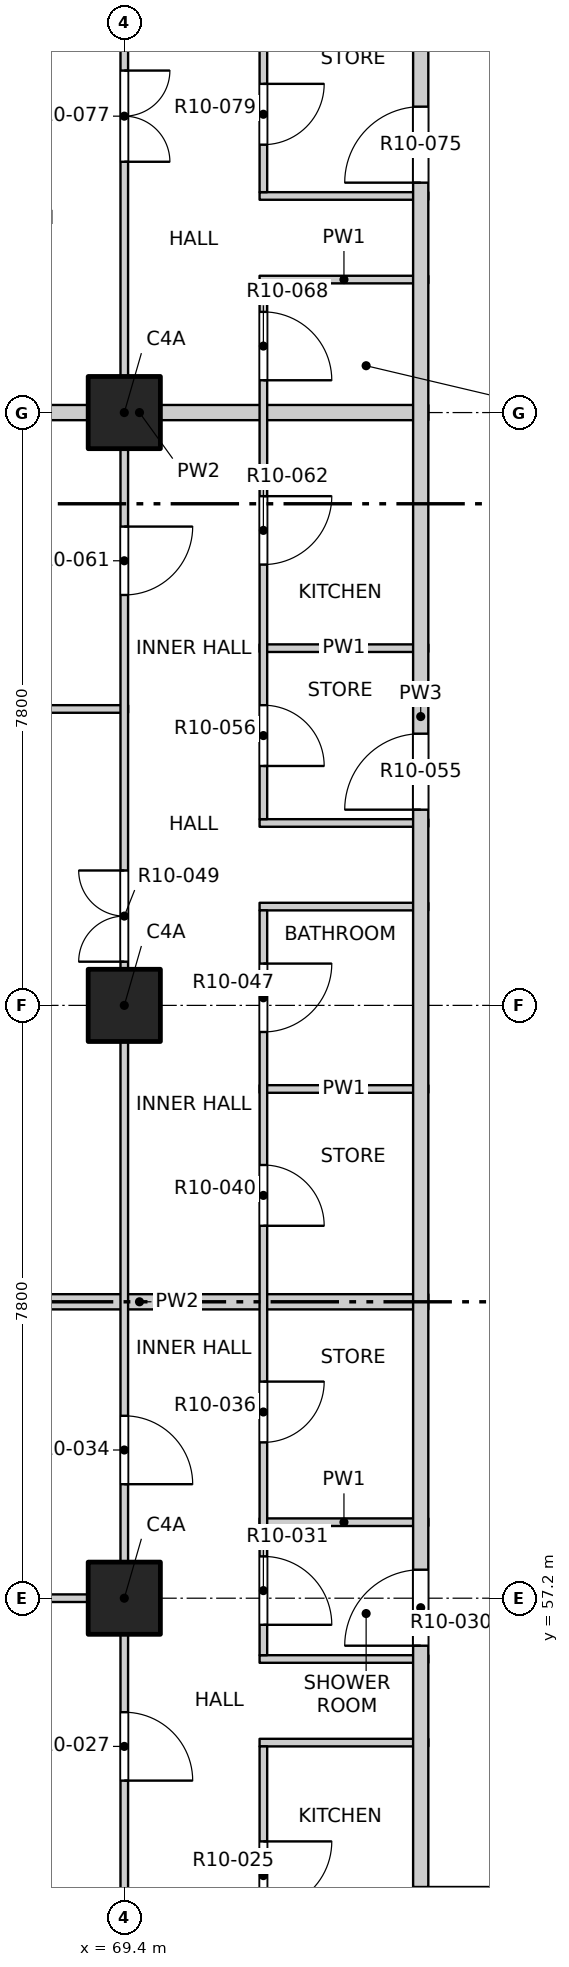
"""IFC4 building model, lengths in metres.
Left out: names, types, materials, properties, quantities, classifications, styles, units other than length and angle.
Written with IfcOpenShell. Run it as: python <this file> out.ifc"""

import sys

from ifc_helpers import new_model, si_unit, direction, frame, frame_2d, origin, origin_2d, place, context, subcontext, project, spatial, rectangle, extrude, element, fill, save


model = new_model("IFC4")
c1 = context("Model", 3, precision=1e-05, world=origin(), true_north=direction((0.0, 1.0)))
c2 = subcontext(c1, "Body", "Model", "MODEL_VIEW")
j1 = project(units=[si_unit("LENGTHUNIT", "METRE"), si_unit("PLANEANGLEUNIT", "RADIAN")], contexts=[c1])
p1 = place(None, origin())
s1 = spatial("IfcSite", under=j1, at=p1, CompositionType="ELEMENT")
p2 = place(p1, origin())
s2 = spatial("IfcBuilding", under=s1, at=p2, CompositionType="ELEMENT")
p3 = place(p2, frame((0.0, 0.0, 127.1)))
s3 = spatial("IfcBuildingStorey", under=s2, at=p3, CompositionType="ELEMENT", Elevation=127.1)
for number, where, z_axis, x_axis in (
    (1, (69.4, 57.2, -0.25), (0.0, 0.0, 1.0), (1.0, 0.0, 0.0)),
    (2, (69.4, 65.0, -0.25), (0.0, 0.0, 1.0), (1.0, 0.0, 0.0)),
    (3, (69.4, 72.8, -0.25), (0.0, 0.0, 1.0), (1.0, 0.0, 0.0)),
):
    element("IfcColumn", number, at=place(p3, frame(where, z_axis=z_axis, x_axis=x_axis)), inside=s3, PredefinedType="COLUMN", context=c2, shape_type="SweptSolid", body=[
        extrude(rectangle(XDim=0.95, YDim=0.95, at=origin_2d()), origin(), (0.0, 0.0, 1.0), 3.4),
    ])
p4 = place(p3, frame((73.2, 53.3, 0.0), z_axis=(0.0, 0.0, 1.0), x_axis=(1.0, 0.0, 0.0)))
e4 = element("IfcWall", 4, at=p4, inside=s3, PredefinedType="PARTITIONING", context=c2, shape_type="SweptSolid", body=[
    extrude(rectangle(XDim=23.6, YDim=0.2, at=frame_2d((11.8, 0.0))), origin(), (0.0, 0.0, 1.0), 3.15),
])
p5 = place(p4, frame((6.175, 0.0, 0.0)))
e5 = element("IfcOpeningElement", 5, at=p5, cuts=e4, PredefinedType="OPENING", context=c2, shape_type="SweptSolid", body=[
    extrude(rectangle(XDim=1.0, YDim=2.1, at=frame_2d((0.5, 1.05))), frame((0.0, 0.11, 0.0), z_axis=(0.0, -1.0, 0.0), x_axis=(1.0, 0.0, 0.0)), (0.0, 0.0, 1.0), 0.22),
])
p6 = place(p4, frame((18.775, 0.0, 0.0)))
e6 = element("IfcOpeningElement", 6, at=p6, cuts=e4, PredefinedType="OPENING", context=c2, shape_type="SweptSolid", body=[
    extrude(rectangle(XDim=1.0, YDim=2.1, at=frame_2d((0.5, 1.05))), frame((0.0, 0.11, 0.0), z_axis=(0.0, -1.0, 0.0), x_axis=(1.0, 0.0, 0.0)), (0.0, 0.0, 1.0), 0.22),
])
for number, where, z_axis, x_axis in (
    (7, (71.18, 55.3, 0.0), (0.0, 0.0, 1.0), (1.0, 0.0, 0.0)),
    (8, (71.18, 56.4, 0.0), (0.0, 0.0, 1.0), (1.0, 0.0, 0.0)),
):
    element("IfcWall", number, at=place(p3, frame(where, z_axis=z_axis, x_axis=x_axis)), inside=s3, PredefinedType="PARTITIONING", context=c2, shape_type="SweptSolid", body=[
        extrude(rectangle(XDim=2.22, YDim=0.1, at=frame_2d((1.11, 0.0))), origin(), (0.0, 0.0, 1.0), 3.15),
    ])
p7 = place(p3, frame((65.8, 57.2, 0.0), z_axis=(0.0, 0.0, 1.0), x_axis=(1.0, 0.0, 0.0)))
e9 = element("IfcWall", 9, at=p7, inside=s3, PredefinedType="PARTITIONING", context=c2, shape_type="SweptSolid", body=[
    extrude(rectangle(XDim=3.65, YDim=0.1, at=frame_2d((1.825, 0.0))), origin(), (0.0, 0.0, 1.0), 3.15),
])
p8 = place(p3, frame((71.18, 58.2, 0.0), z_axis=(0.0, 0.0, 1.0), x_axis=(1.0, 0.0, 0.0)))
e10 = element("IfcWall", 10, at=p8, inside=s3, PredefinedType="PARTITIONING", context=c2, shape_type="SweptSolid", body=[
    extrude(rectangle(XDim=2.22, YDim=0.1, at=frame_2d((1.11, 0.0))), origin(), (0.0, 0.0, 1.0), 3.15),
])
p9 = place(p3, frame((65.8, 61.1, 0.0), z_axis=(0.0, 0.0, 1.0), x_axis=(1.0, 0.0, 0.0)))
e11 = element("IfcWall", 11, at=p9, inside=s3, PredefinedType="PARTITIONING", context=c2, shape_type="SweptSolid", body=[
    extrude(rectangle(XDim=7.6, YDim=0.2, at=frame_2d((3.8, 0.0))), origin(), (0.0, 0.0, 1.0), 2.55),
])
for number, where, z_axis, x_axis in (
    (12, (71.18, 63.9, 0.0), (0.0, 0.0, 1.0), (1.0, 0.0, 0.0)),
    (13, (71.18, 66.3, 0.0), (0.0, 0.0, 1.0), (1.0, 0.0, 0.0)),
    (14, (71.18, 67.4, 0.0), (0.0, 0.0, 1.0), (1.0, 0.0, 0.0)),
):
    element("IfcWall", number, at=place(p3, frame(where, z_axis=z_axis, x_axis=x_axis)), inside=s3, PredefinedType="PARTITIONING", context=c2, shape_type="SweptSolid", body=[
        extrude(rectangle(XDim=2.22, YDim=0.1, at=frame_2d((1.11, 0.0))), origin(), (0.0, 0.0, 1.0), 3.15),
    ])
p10 = place(p3, frame((65.8, 68.9, 0.0), z_axis=(0.0, 0.0, 1.0), x_axis=(1.0, 0.0, 0.0)))
e15 = element("IfcWall", 15, at=p10, inside=s3, PredefinedType="PARTITIONING", context=c2, shape_type="SweptSolid", body=[
    extrude(rectangle(XDim=3.65, YDim=0.1, at=frame_2d((1.825, 0.0))), origin(), (0.0, 0.0, 1.0), 2.55),
])
p11 = place(p3, frame((71.18, 69.7, 0.0), z_axis=(0.0, 0.0, 1.0), x_axis=(1.0, 0.0, 0.0)))
e16 = element("IfcWall", 16, at=p11, inside=s3, PredefinedType="PARTITIONING", context=c2, shape_type="SweptSolid", body=[
    extrude(rectangle(XDim=2.22, YDim=0.1, at=frame_2d((1.11, 0.0))), origin(), (0.0, 0.0, 1.0), 3.15),
])
p12 = place(p3, frame((65.8, 72.8, 0.0), z_axis=(0.0, 0.0, 1.0), x_axis=(1.0, 0.0, 0.0)))
e17 = element("IfcWall", 17, at=p12, inside=s3, PredefinedType="PARTITIONING", context=c2, shape_type="SweptSolid", body=[
    extrude(rectangle(XDim=7.6, YDim=0.2, at=frame_2d((3.8, 0.0))), origin(), (0.0, 0.0, 1.0), 3.15),
])
for number, where, z_axis, x_axis in (
    (18, (71.18, 74.55, 0.0), (0.0, 0.0, 1.0), (1.0, 0.0, 0.0)),
    (19, (71.18, 75.65, 0.0), (0.0, 0.0, 1.0), (1.0, 0.0, 0.0)),
):
    element("IfcWall", number, at=place(p3, frame(where, z_axis=z_axis, x_axis=x_axis)), inside=s3, PredefinedType="PARTITIONING", context=c2, shape_type="SweptSolid", body=[
        extrude(rectangle(XDim=2.22, YDim=0.1, at=frame_2d((1.11, 0.0))), origin(), (0.0, 0.0, 1.0), 3.15),
    ])
p13 = place(p3, frame((69.4, 45.8, 0.0), z_axis=(0.0, 0.0, 1.0), x_axis=(0.0, 1.0, 0.0)))
e20 = element("IfcWall", 20, at=p13, inside=s3, PredefinedType="PARTITIONING", context=c2, shape_type="SweptSolid", body=[
    extrude(rectangle(XDim=38.4, YDim=0.1, at=frame_2d((19.2, 0.0))), origin(), (0.0, 0.0, 1.0), 3.15),
])
p14 = place(p13, frame((1.05, 0.0, 0.0)))
e21 = element("IfcOpeningElement", 21, at=p14, cuts=e20, PredefinedType="OPENING", context=c2, shape_type="SweptSolid", body=[
    extrude(rectangle(XDim=1.2, YDim=2.1, at=frame_2d((0.6, 1.05))), frame((0.0, 0.06, 0.0), z_axis=(0.0, -1.0, 0.0), x_axis=(1.0, 0.0, 0.0)), (0.0, 0.0, 1.0), 0.12),
])
p15 = place(p13, frame((5.1, 0.0, 0.0)))
e22 = element("IfcOpeningElement", 22, at=p15, cuts=e20, PredefinedType="OPENING", context=c2, shape_type="SweptSolid", body=[
    extrude(rectangle(XDim=0.9, YDim=2.1, at=frame_2d((0.45, 1.05))), frame((0.0, 0.06, 0.0), z_axis=(0.0, -1.0, 0.0), x_axis=(1.0, 0.0, 0.0)), (0.0, 0.0, 1.0), 0.12),
])
p16 = place(p13, frame((9.0, 0.0, 0.0)))
e23 = element("IfcOpeningElement", 23, at=p16, cuts=e20, PredefinedType="OPENING", context=c2, shape_type="SweptSolid", body=[
    extrude(rectangle(XDim=0.9, YDim=2.1, at=frame_2d((0.45, 1.05))), frame((0.0, 0.06, 0.0), z_axis=(0.0, -1.0, 0.0), x_axis=(1.0, 0.0, 0.0)), (0.0, 0.0, 1.0), 0.12),
])
p17 = place(p13, frame((12.9, 0.0, 0.0)))
e24 = element("IfcOpeningElement", 24, at=p17, cuts=e20, PredefinedType="OPENING", context=c2, shape_type="SweptSolid", body=[
    extrude(rectangle(XDim=0.9, YDim=2.1, at=frame_2d((0.45, 1.05))), frame((0.0, 0.06, 0.0), z_axis=(0.0, -1.0, 0.0), x_axis=(1.0, 0.0, 0.0)), (0.0, 0.0, 1.0), 0.12),
])
p18 = place(p13, frame((19.775, 0.0, 0.0)))
e25 = element("IfcOpeningElement", 25, at=p18, cuts=e20, PredefinedType="OPENING", context=c2, shape_type="SweptSolid", body=[
    extrude(rectangle(XDim=1.2, YDim=2.1, at=frame_2d((0.6, 1.05))), frame((0.0, 0.06, 0.0), z_axis=(0.0, -1.0, 0.0), x_axis=(1.0, 0.0, 0.0)), (0.0, 0.0, 1.0), 0.12),
])
p19 = place(p13, frame((24.6, 0.0, 0.0)))
e26 = element("IfcOpeningElement", 26, at=p19, cuts=e20, PredefinedType="OPENING", context=c2, shape_type="SweptSolid", body=[
    extrude(rectangle(XDim=0.9, YDim=2.1, at=frame_2d((0.45, 1.05))), frame((0.0, 0.06, 0.0), z_axis=(0.0, -1.0, 0.0), x_axis=(1.0, 0.0, 0.0)), (0.0, 0.0, 1.0), 0.12),
])
p20 = place(p13, frame((30.3, 0.0, 0.0)))
e27 = element("IfcOpeningElement", 27, at=p20, cuts=e20, PredefinedType="OPENING", context=c2, shape_type="SweptSolid", body=[
    extrude(rectangle(XDim=1.2, YDim=2.1, at=frame_2d((0.6, 1.05))), frame((0.0, 0.06, 0.0), z_axis=(0.0, -1.0, 0.0), x_axis=(1.0, 0.0, 0.0)), (0.0, 0.0, 1.0), 0.12),
])
p21 = place(p13, frame((36.15, 0.0, 0.0)))
e28 = element("IfcOpeningElement", 28, at=p21, cuts=e20, PredefinedType="OPENING", context=c2, shape_type="SweptSolid", body=[
    extrude(rectangle(XDim=1.2, YDim=2.1, at=frame_2d((0.6, 1.05))), frame((0.0, 0.06, 0.0), z_axis=(0.0, -1.0, 0.0), x_axis=(1.0, 0.0, 0.0)), (0.0, 0.0, 1.0), 0.12),
])
p22 = place(p3, frame((71.23, 49.45, 0.0), z_axis=(0.0, 0.0, 1.0), x_axis=(0.0, 1.0, 0.0)))
e29 = element("IfcWall", 29, at=p22, inside=s3, PredefinedType="PARTITIONING", context=c2, shape_type="SweptSolid", body=[
    extrude(rectangle(XDim=5.8, YDim=0.1, at=frame_2d((2.9, 0.0))), origin(), (0.0, 0.0, 1.0), 3.15),
])
p23 = place(p22, frame((0.7, 0.0, 0.0)))
e30 = element("IfcOpeningElement", 30, at=p23, cuts=e29, PredefinedType="OPENING", context=c2, shape_type="SweptSolid", body=[
    extrude(rectangle(XDim=0.9, YDim=2.1, at=frame_2d((0.45, 1.05))), frame((0.0, 0.06, 0.0), z_axis=(0.0, -1.0, 0.0), x_axis=(1.0, 0.0, 0.0)), (0.0, 0.0, 1.0), 0.12),
])
p24 = place(p22, frame((3.65, 0.0, 0.0)))
e31 = element("IfcOpeningElement", 31, at=p24, cuts=e29, PredefinedType="OPENING", context=c2, shape_type="SweptSolid", body=[
    extrude(rectangle(XDim=0.9, YDim=2.1, at=frame_2d((0.45, 1.05))), frame((0.0, 0.06, 0.0), z_axis=(0.0, -1.0, 0.0), x_axis=(1.0, 0.0, 0.0)), (0.0, 0.0, 1.0), 0.12),
])
p25 = place(p3, frame((71.23, 56.45, 0.0), z_axis=(0.0, 0.0, 1.0), x_axis=(0.0, 1.0, 0.0)))
e32 = element("IfcWall", 32, at=p25, inside=s3, PredefinedType="PARTITIONING", context=c2, shape_type="SweptSolid", body=[
    extrude(rectangle(XDim=9.8, YDim=0.1, at=frame_2d((4.9, 0.0))), origin(), (0.0, 0.0, 1.0), 3.15),
])
p26 = place(p25, frame((0.4, 0.0, 0.0)))
e33 = element("IfcOpeningElement", 33, at=p26, cuts=e32, PredefinedType="OPENING", context=c2, shape_type="SweptSolid", body=[
    extrude(rectangle(XDim=0.9, YDim=2.1, at=frame_2d((0.45, 1.05))), frame((0.0, 0.06, 0.0), z_axis=(0.0, -1.0, 0.0), x_axis=(1.0, 0.0, 0.0)), (0.0, 0.0, 1.0), 0.12),
])
p27 = place(p25, frame((2.8, 0.0, 0.0)))
e34 = element("IfcOpeningElement", 34, at=p27, cuts=e32, PredefinedType="OPENING", context=c2, shape_type="SweptSolid", body=[
    extrude(rectangle(XDim=0.8, YDim=2.1, at=frame_2d((0.4, 1.05))), frame((0.0, 0.06, 0.0), z_axis=(0.0, -1.0, 0.0), x_axis=(1.0, 0.0, 0.0)), (0.0, 0.0, 1.0), 0.12),
])
p28 = place(p25, frame((5.65, 0.0, 0.0)))
e35 = element("IfcOpeningElement", 35, at=p28, cuts=e32, PredefinedType="OPENING", context=c2, shape_type="SweptSolid", body=[
    extrude(rectangle(XDim=0.8, YDim=2.1, at=frame_2d((0.4, 1.05))), frame((0.0, 0.06, 0.0), z_axis=(0.0, -1.0, 0.0), x_axis=(1.0, 0.0, 0.0)), (0.0, 0.0, 1.0), 0.12),
])
p29 = place(p25, frame((8.2, 0.0, 0.0)))
e36 = element("IfcOpeningElement", 36, at=p29, cuts=e32, PredefinedType="OPENING", context=c2, shape_type="SweptSolid", body=[
    extrude(rectangle(XDim=0.9, YDim=2.1, at=frame_2d((0.45, 1.05))), frame((0.0, 0.06, 0.0), z_axis=(0.0, -1.0, 0.0), x_axis=(1.0, 0.0, 0.0)), (0.0, 0.0, 1.0), 0.12),
])
p30 = place(p3, frame((71.23, 67.45, 0.0), z_axis=(0.0, 0.0, 1.0), x_axis=(0.0, 1.0, 0.0)))
e37 = element("IfcWall", 37, at=p30, inside=s3, PredefinedType="PARTITIONING", context=c2, shape_type="SweptSolid", body=[
    extrude(rectangle(XDim=7.05, YDim=0.1, at=frame_2d((3.525, 0.0))), origin(), (0.0, 0.0, 1.0), 3.15),
])
p31 = place(p30, frame((0.7, 0.0, 0.0)))
e38 = element("IfcOpeningElement", 38, at=p31, cuts=e37, PredefinedType="OPENING", context=c2, shape_type="SweptSolid", body=[
    extrude(rectangle(XDim=0.8, YDim=2.1, at=frame_2d((0.4, 1.05))), frame((0.0, 0.06, 0.0), z_axis=(0.0, -1.0, 0.0), x_axis=(1.0, 0.0, 0.0)), (0.0, 0.0, 1.0), 0.12),
])
p32 = place(p30, frame((3.35, 0.0, 0.0)))
e39 = element("IfcOpeningElement", 39, at=p32, cuts=e37, PredefinedType="OPENING", context=c2, shape_type="SweptSolid", body=[
    extrude(rectangle(XDim=0.9, YDim=2.1, at=frame_2d((0.45, 1.05))), frame((0.0, 0.06, 0.0), z_axis=(0.0, -1.0, 0.0), x_axis=(1.0, 0.0, 0.0)), (0.0, 0.0, 1.0), 0.12),
])
p33 = place(p30, frame((5.775, 0.0, 0.0)))
e40 = element("IfcOpeningElement", 40, at=p33, cuts=e37, PredefinedType="OPENING", context=c2, shape_type="SweptSolid", body=[
    extrude(rectangle(XDim=0.9, YDim=2.1, at=frame_2d((0.45, 1.05))), frame((0.0, 0.06, 0.0), z_axis=(0.0, -1.0, 0.0), x_axis=(1.0, 0.0, 0.0)), (0.0, 0.0, 1.0), 0.12),
])
p34 = place(p3, frame((71.23, 75.7, 0.0), z_axis=(0.0, 0.0, 1.0), x_axis=(0.0, 1.0, 0.0)))
e41 = element("IfcWall", 41, at=p34, inside=s3, PredefinedType="PARTITIONING", context=c2, shape_type="SweptSolid", body=[
    extrude(rectangle(XDim=4.85, YDim=0.1, at=frame_2d((2.425, 0.0))), origin(), (0.0, 0.0, 1.0), 3.15),
])
p35 = place(p34, frame((0.625, 0.0, 0.0)))
e42 = element("IfcOpeningElement", 42, at=p35, cuts=e41, PredefinedType="OPENING", context=c2, shape_type="SweptSolid", body=[
    extrude(rectangle(XDim=0.8, YDim=2.1, at=frame_2d((0.4, 1.05))), frame((0.0, 0.06, 0.0), z_axis=(0.0, -1.0, 0.0), x_axis=(1.0, 0.0, 0.0)), (0.0, 0.0, 1.0), 0.12),
])
p36 = place(p34, frame((3.05, 0.0, 0.0)))
e43 = element("IfcOpeningElement", 43, at=p36, cuts=e41, PredefinedType="OPENING", context=c2, shape_type="SweptSolid", body=[
    extrude(rectangle(XDim=0.9, YDim=2.1, at=frame_2d((0.45, 1.05))), frame((0.0, 0.06, 0.0), z_axis=(0.0, -1.0, 0.0), x_axis=(1.0, 0.0, 0.0)), (0.0, 0.0, 1.0), 0.12),
])
p37 = place(p3, frame((73.3, 53.4, 0.0), z_axis=(0.0, 0.0, 1.0), x_axis=(0.0, 1.0, 0.0)))
e44 = element("IfcWall", 44, at=p37, inside=s3, PredefinedType="PARTITIONING", context=c2, shape_type="SweptSolid", body=[
    extrude(rectangle(XDim=30.8, YDim=0.2, at=frame_2d((15.4, 0.0))), origin(), (0.0, 0.0, 1.0), 3.15),
])
p38 = place(p37, frame((3.175, 0.0, 0.0)))
e45 = element("IfcOpeningElement", 45, at=p38, cuts=e44, PredefinedType="OPENING", context=c2, shape_type="SweptSolid", body=[
    extrude(rectangle(XDim=1.0, YDim=2.1, at=frame_2d((0.5, 1.05))), frame((0.0, 0.11, 0.0), z_axis=(0.0, -1.0, 0.0), x_axis=(1.0, 0.0, 0.0)), (0.0, 0.0, 1.0), 0.22),
])
p39 = place(p37, frame((14.175, 0.0, 0.0)))
e46 = element("IfcOpeningElement", 46, at=p39, cuts=e44, PredefinedType="OPENING", context=c2, shape_type="SweptSolid", body=[
    extrude(rectangle(XDim=1.0, YDim=2.1, at=frame_2d((0.5, 1.05))), frame((0.0, 0.11, 0.0), z_axis=(0.0, -1.0, 0.0), x_axis=(1.0, 0.0, 0.0)), (0.0, 0.0, 1.0), 0.22),
])
p40 = place(p37, frame((22.425, 0.0, 0.0)))
e47 = element("IfcOpeningElement", 47, at=p40, cuts=e44, PredefinedType="OPENING", context=c2, shape_type="SweptSolid", body=[
    extrude(rectangle(XDim=1.0, YDim=2.1, at=frame_2d((0.5, 1.05))), frame((0.0, 0.11, 0.0), z_axis=(0.0, -1.0, 0.0), x_axis=(1.0, 0.0, 0.0)), (0.0, 0.0, 1.0), 0.22),
])
p41 = place(p24, origin())
e48 = element("IfcDoor", 48, at=p41, inside=s3, OperationType="SINGLE_SWING_LEFT", PredefinedType="DOOR", context=c2, shape_type="SweptSolid", body=[
    extrude(rectangle(XDim=0.9, YDim=2.1, at=frame_2d((0.45, 1.05))), frame((0.0, 0.025, 0.0), z_axis=(0.0, -1.0, 0.0), x_axis=(1.0, 0.0, 0.0)), (0.0, 0.0, 1.0), 0.05),
])
fill(e31, e48)
p42 = place(p16, origin())
e49 = element("IfcDoor", 49, at=p42, inside=s3, OperationType="SINGLE_SWING_RIGHT", PredefinedType="DOOR", context=c2, shape_type="SweptSolid", body=[
    extrude(rectangle(XDim=0.9, YDim=2.1, at=frame_2d((0.45, 1.05))), frame((0.0, 0.025, 0.0), z_axis=(0.0, -1.0, 0.0), x_axis=(1.0, 0.0, 0.0)), (0.0, 0.0, 1.0), 0.05),
])
fill(e23, e49)
p43 = place(p38, origin())
e50 = element("IfcDoor", 50, at=p43, inside=s3, OperationType="SINGLE_SWING_RIGHT", PredefinedType="DOOR", context=c2, shape_type="SweptSolid", body=[
    extrude(rectangle(XDim=1.0, YDim=2.1, at=frame_2d((0.5, 1.05))), frame((0.0, 0.025, 0.0), z_axis=(0.0, -1.0, 0.0), x_axis=(1.0, 0.0, 0.0)), (0.0, 0.0, 1.0), 0.05),
])
fill(e45, e50)
p44 = place(p26, origin())
e51 = element("IfcDoor", 51, at=p44, inside=s3, OperationType="SINGLE_SWING_RIGHT", PredefinedType="DOOR", context=c2, shape_type="SweptSolid", body=[
    extrude(rectangle(XDim=0.9, YDim=2.1, at=frame_2d((0.45, 1.05))), frame((0.0, 0.025, 0.0), z_axis=(0.0, -1.0, 0.0), x_axis=(1.0, 0.0, 0.0)), (0.0, 0.0, 1.0), 0.05),
])
fill(e33, e51)
p45 = place(p17, origin())
e52 = element("IfcDoor", 52, at=p45, inside=s3, OperationType="SINGLE_SWING_RIGHT", PredefinedType="DOOR", context=c2, shape_type="SweptSolid", body=[
    extrude(rectangle(XDim=0.9, YDim=2.1, at=frame_2d((0.45, 1.05))), frame((0.0, 0.025, 0.0), z_axis=(0.0, -1.0, 0.0), x_axis=(1.0, 0.0, 0.0)), (0.0, 0.0, 1.0), 0.05),
])
fill(e24, e52)
p46 = place(p27, origin())
e53 = element("IfcDoor", 53, at=p46, inside=s3, OperationType="SINGLE_SWING_LEFT", PredefinedType="DOOR", context=c2, shape_type="SweptSolid", body=[
    extrude(rectangle(XDim=0.8, YDim=2.1, at=frame_2d((0.4, 1.05))), frame((0.0, 0.025, 0.0), z_axis=(0.0, -1.0, 0.0), x_axis=(1.0, 0.0, 0.0)), (0.0, 0.0, 1.0), 0.05),
])
fill(e34, e53)
p47 = place(p28, origin())
e54 = element("IfcDoor", 54, at=p47, inside=s3, OperationType="SINGLE_SWING_RIGHT", PredefinedType="DOOR", context=c2, shape_type="SweptSolid", body=[
    extrude(rectangle(XDim=0.8, YDim=2.1, at=frame_2d((0.4, 1.05))), frame((0.0, 0.025, 0.0), z_axis=(0.0, -1.0, 0.0), x_axis=(1.0, 0.0, 0.0)), (0.0, 0.0, 1.0), 0.05),
])
fill(e35, e54)
p48 = place(p29, origin())
e55 = element("IfcDoor", 55, at=p48, inside=s3, OperationType="SINGLE_SWING_LEFT", PredefinedType="DOOR", context=c2, shape_type="SweptSolid", body=[
    extrude(rectangle(XDim=0.9, YDim=2.1, at=frame_2d((0.45, 1.05))), frame((0.0, 0.025, 0.0), z_axis=(0.0, -1.0, 0.0), x_axis=(1.0, 0.0, 0.0)), (0.0, 0.0, 1.0), 0.05),
])
fill(e36, e55)
p49 = place(p18, origin())
e56 = element("IfcDoor", 56, at=p49, inside=s3, OperationType="DOUBLE_DOOR_SINGLE_SWING", PredefinedType="DOOR", context=c2, shape_type="SweptSolid", body=[
    extrude(rectangle(XDim=1.2, YDim=2.1, at=frame_2d((0.6, 1.05))), frame((0.0, 0.025, 0.0), z_axis=(0.0, -1.0, 0.0), x_axis=(1.0, 0.0, 0.0)), (0.0, 0.0, 1.0), 0.05),
])
fill(e25, e56)
p50 = place(p39, origin())
e57 = element("IfcDoor", 57, at=p50, inside=s3, OperationType="SINGLE_SWING_RIGHT", PredefinedType="DOOR", context=c2, shape_type="SweptSolid", body=[
    extrude(rectangle(XDim=1.0, YDim=2.1, at=frame_2d((0.5, 1.05))), frame((0.0, 0.025, 0.0), z_axis=(0.0, -1.0, 0.0), x_axis=(1.0, 0.0, 0.0)), (0.0, 0.0, 1.0), 0.05),
])
fill(e46, e57)
p51 = place(p31, origin())
e58 = element("IfcDoor", 58, at=p51, inside=s3, OperationType="SINGLE_SWING_RIGHT", PredefinedType="DOOR", context=c2, shape_type="SweptSolid", body=[
    extrude(rectangle(XDim=0.8, YDim=2.1, at=frame_2d((0.4, 1.05))), frame((0.0, 0.025, 0.0), z_axis=(0.0, -1.0, 0.0), x_axis=(1.0, 0.0, 0.0)), (0.0, 0.0, 1.0), 0.05),
])
fill(e38, e58)
p52 = place(p19, origin())
e59 = element("IfcDoor", 59, at=p52, inside=s3, OperationType="SINGLE_SWING_LEFT", PredefinedType="DOOR", context=c2, shape_type="SweptSolid", body=[
    extrude(rectangle(XDim=0.9, YDim=2.1, at=frame_2d((0.45, 1.05))), frame((0.0, 0.025, 0.0), z_axis=(0.0, -1.0, 0.0), x_axis=(1.0, 0.0, 0.0)), (0.0, 0.0, 1.0), 0.05),
])
fill(e26, e59)
p53 = place(p32, origin())
e60 = element("IfcDoor", 60, at=p53, inside=s3, OperationType="SINGLE_SWING_LEFT", PredefinedType="DOOR", context=c2, shape_type="SweptSolid", body=[
    extrude(rectangle(XDim=0.9, YDim=2.1, at=frame_2d((0.45, 1.05))), frame((0.0, 0.025, 0.0), z_axis=(0.0, -1.0, 0.0), x_axis=(1.0, 0.0, 0.0)), (0.0, 0.0, 1.0), 0.05),
])
fill(e39, e60)
p54 = place(p33, origin())
e61 = element("IfcDoor", 61, at=p54, inside=s3, OperationType="SINGLE_SWING_RIGHT", PredefinedType="DOOR", context=c2, shape_type="SweptSolid", body=[
    extrude(rectangle(XDim=0.9, YDim=2.1, at=frame_2d((0.45, 1.05))), frame((0.0, 0.025, 0.0), z_axis=(0.0, -1.0, 0.0), x_axis=(1.0, 0.0, 0.0)), (0.0, 0.0, 1.0), 0.05),
])
fill(e40, e61)
p55 = place(p40, origin())
e62 = element("IfcDoor", 62, at=p55, inside=s3, OperationType="SINGLE_SWING_RIGHT", PredefinedType="DOOR", context=c2, shape_type="SweptSolid", body=[
    extrude(rectangle(XDim=1.0, YDim=2.1, at=frame_2d((0.5, 1.05))), frame((0.0, 0.025, 0.0), z_axis=(0.0, -1.0, 0.0), x_axis=(1.0, 0.0, 0.0)), (0.0, 0.0, 1.0), 0.05),
])
fill(e47, e62)
p56 = place(p20, origin())
e63 = element("IfcDoor", 63, at=p56, inside=s3, OperationType="DOUBLE_DOOR_SINGLE_SWING", PredefinedType="DOOR", context=c2, shape_type="SweptSolid", body=[
    extrude(rectangle(XDim=1.2, YDim=2.1, at=frame_2d((0.6, 1.05))), frame((0.0, 0.025, 0.0), z_axis=(0.0, -1.0, 0.0), x_axis=(1.0, 0.0, 0.0)), (0.0, 0.0, 1.0), 0.05),
])
fill(e27, e63)
p57 = place(p35, origin())
e64 = element("IfcDoor", 64, at=p57, inside=s3, OperationType="SINGLE_SWING_LEFT", PredefinedType="DOOR", context=c2, shape_type="SweptSolid", body=[
    extrude(rectangle(XDim=0.8, YDim=2.1, at=frame_2d((0.4, 1.05))), frame((0.0, 0.025, 0.0), z_axis=(0.0, -1.0, 0.0), x_axis=(1.0, 0.0, 0.0)), (0.0, 0.0, 1.0), 0.05),
])
fill(e42, e64)
save(model, sys.argv[1])
